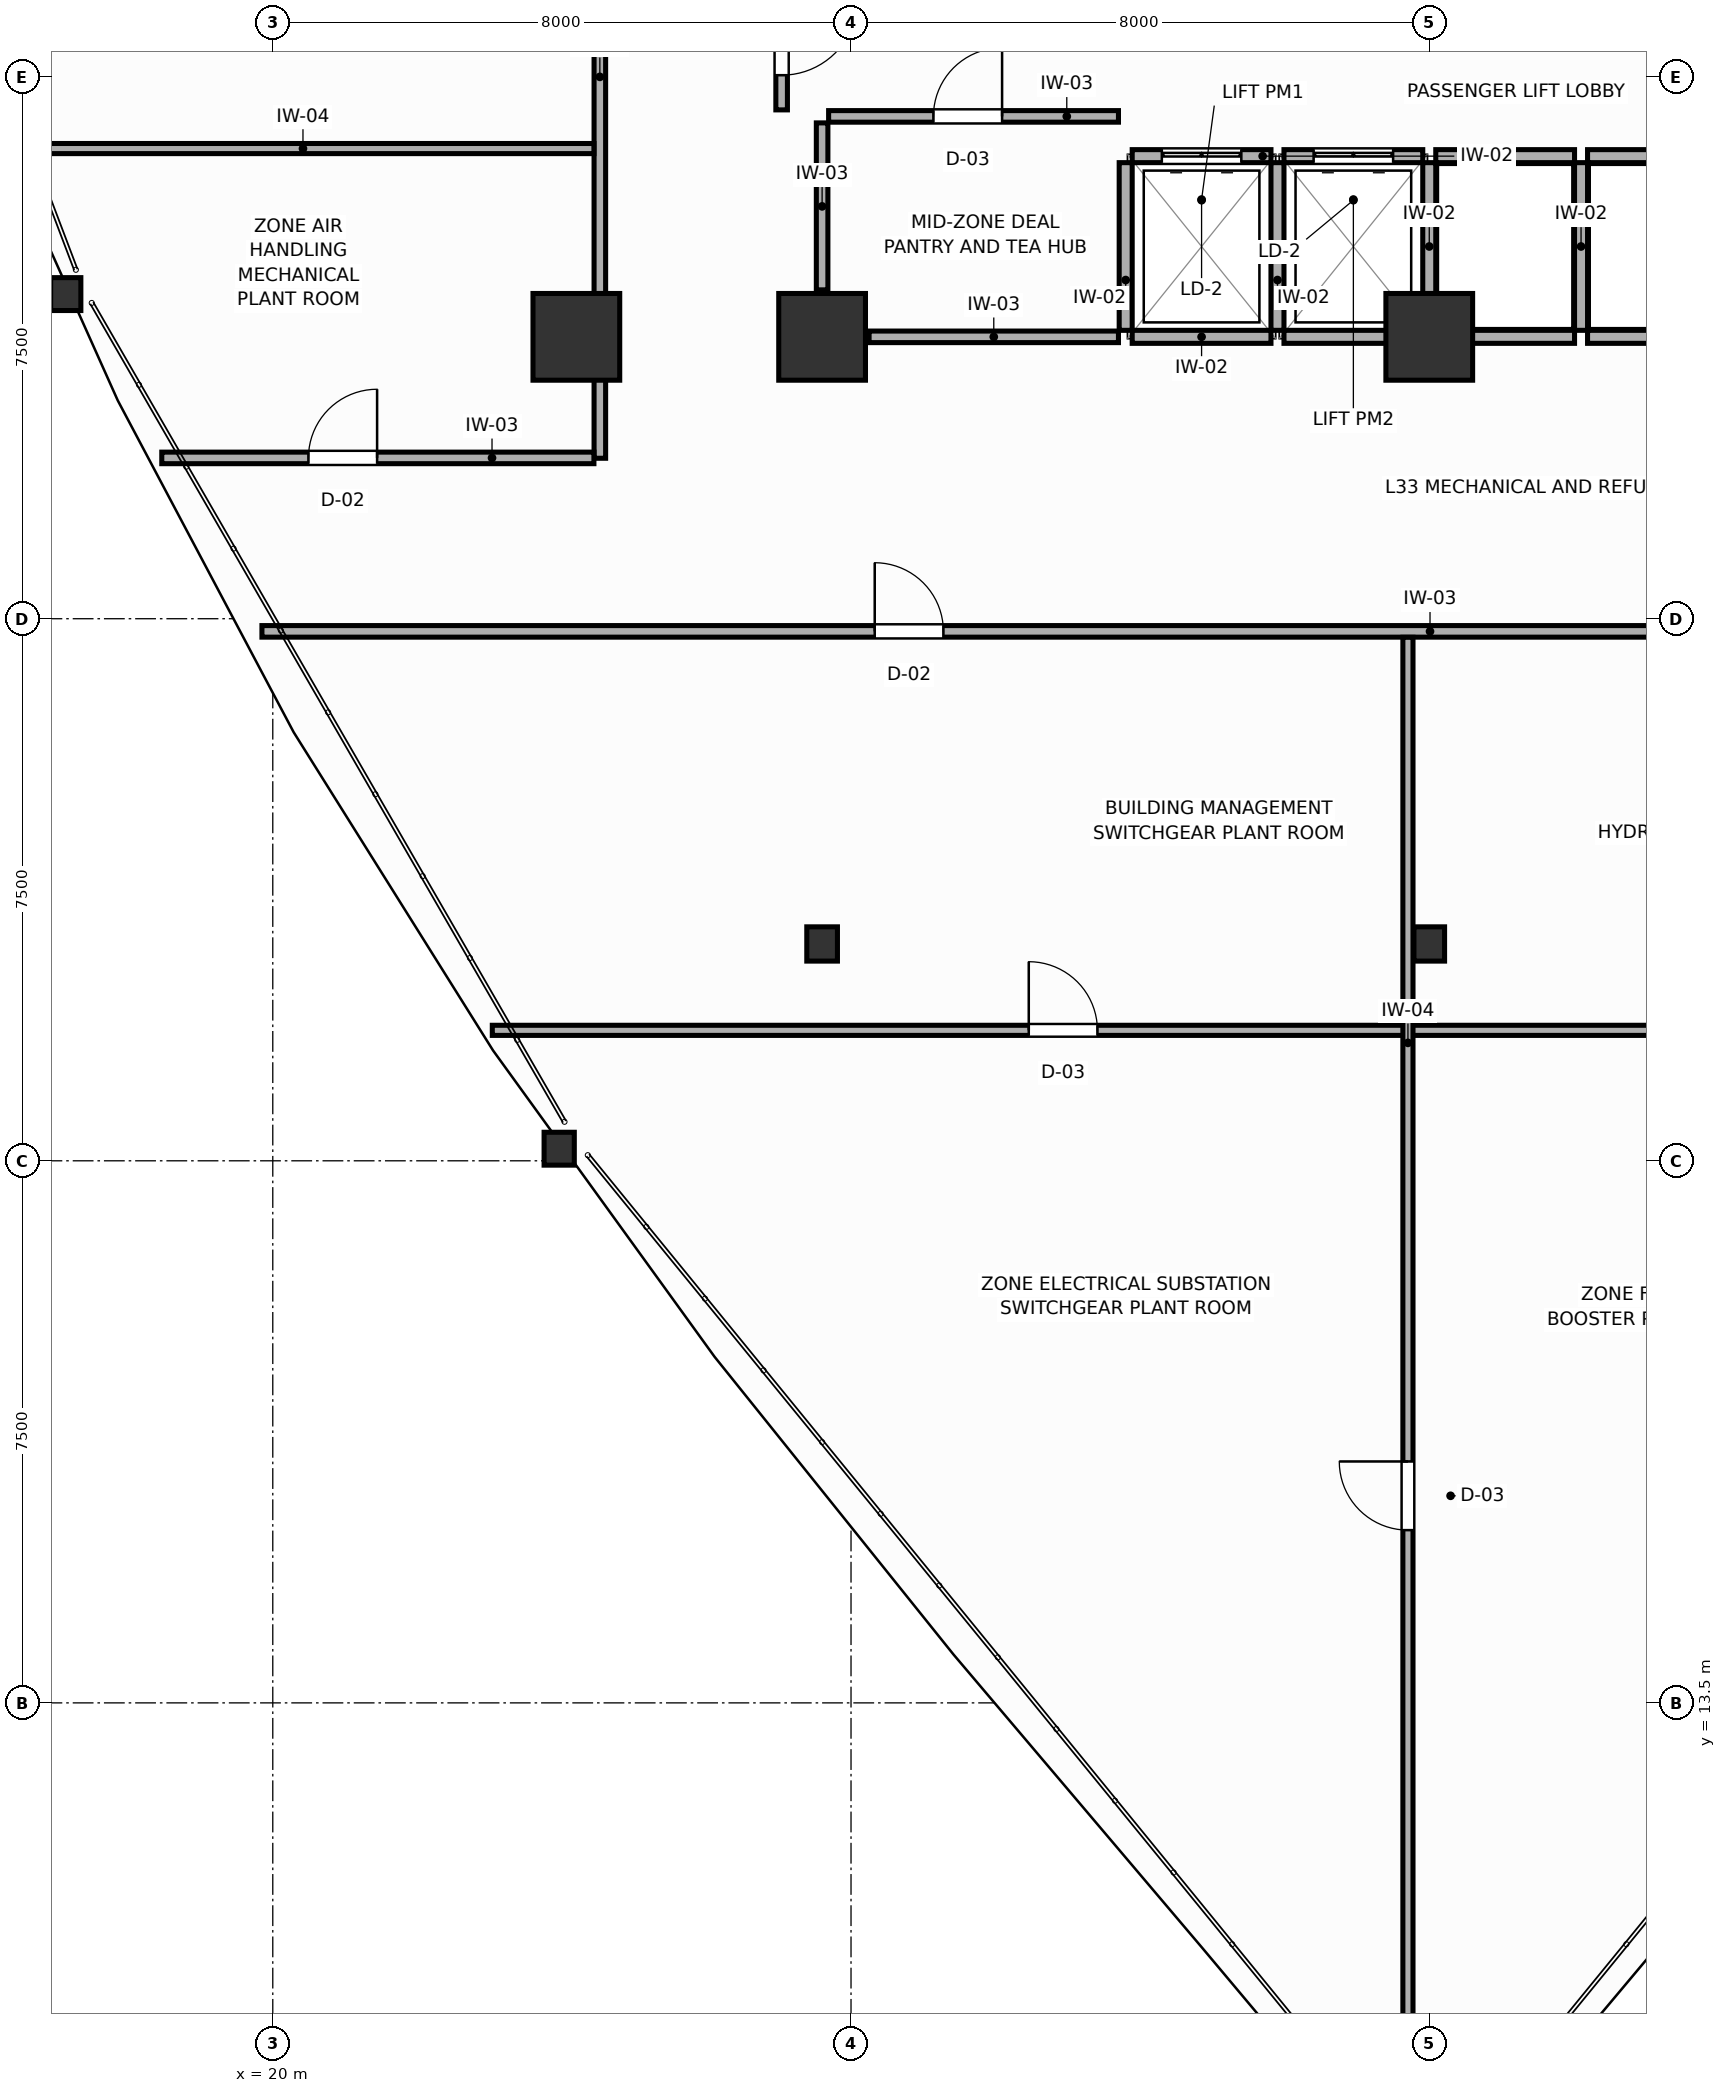
"""IFC4 building model, lengths in metres.
Left out: names, types, materials, properties, quantities, classifications, styles, units other than length and angle.
Written with IfcOpenShell. Run it as: python <this file> out.ifc"""

import sys

from ifc_helpers import new_model, si_unit, direction, frame, frame_2d, origin, origin_2d, place, context, subcontext, project, spatial, rectangle, i_section, extrude, source, transform, mapped, element, fill, save


model = new_model("IFC4")
c1 = context("Model", 3, precision=1e-05, world=origin(), true_north=direction((0.0, 1.0)))
c2 = subcontext(c1, "Body", "Model", "MODEL_VIEW")
j1 = project(units=[si_unit("LENGTHUNIT", "METRE"), si_unit("PLANEANGLEUNIT", "RADIAN")], contexts=[c1])
p1 = place(None, origin())
s1 = spatial("IfcSite", under=j1, at=p1, CompositionType="ELEMENT")
p2 = place(p1, origin())
s2 = spatial("IfcBuilding", under=s1, at=p2, CompositionType="ELEMENT")
p3 = place(p2, frame((0.0, 0.0, 131.4)))
s3 = spatial("IfcBuildingStorey", under=s2, at=p3, CompositionType="ELEMENT", Elevation=131.4)
m1 = source(origin(), c2, "Body", "SweptSolid", [
    extrude(rectangle(XDim=1.2, YDim=1.2, at=origin_2d()), origin(), (0.0, 0.0, 1.0), 4.8),
])
for number, where, z_axis, x_axis in (
    (1, (27.6, 32.4, 0.0), (0.0, 0.0, 1.0), (1.0, 0.0, 0.0)),
    (2, (36.0, 32.4, 0.0), (0.0, 0.0, 1.0), (1.0, 0.0, 0.0)),
    (3, (24.2, 32.4, 0.0), (0.0, 0.0, 1.0), (1.0, 0.0, 0.0)),
):
    element("IfcColumn", number, at=place(p3, frame(where, z_axis=z_axis, x_axis=x_axis)), inside=s3, PredefinedType="COLUMN", context=c2, shape_type="MappedRepresentation", body=[
        mapped(m1, transform((0.0, 0.0, 0.0), scale=1.0)),
    ])
m2 = source(origin(), c2, "Body", "SweptSolid", [
    extrude(i_section(OverallWidth=0.424, OverallDepth=0.474, WebThickness=0.045, FlangeThickness=0.072, FilletRadius=0.015, at=origin_2d()), origin(), (0.0, 0.0, 1.0), 4.8),
])
for number, where, z_axis, x_axis in (
    (4, (27.6, 24.0, 0.0), (0.0, 0.0, 1.0), (1.0, 0.0, 0.0)),
    (5, (36.0, 24.0, 0.0), (0.0, 0.0, 1.0), (1.0, 0.0, 0.0)),
):
    element("IfcColumn", number, at=place(p3, frame(where, z_axis=z_axis, x_axis=x_axis)), inside=s3, PredefinedType="COLUMN", context=c2, shape_type="MappedRepresentation", body=[
        mapped(m2, transform((0.0, 0.0, 0.0), scale=1.0)),
    ])
m3 = source(origin(), c2, "Body", "SweptSolid", [
    extrude(i_section(OverallWidth=0.418, OverallDepth=0.455, WebThickness=0.039, FlangeThickness=0.063, FilletRadius=0.015, at=origin_2d()), origin(), (0.0, 0.0, 1.0), 4.8),
])
for number, where, z_axis, x_axis in (
    (6, (17.136, 32.991, 0.0), (0.0, 0.0, 1.0), (1.0, 0.0, 0.0)),
    (7, (23.962, 21.167, 0.0), (0.0, 0.0, 1.0), (1.0, 0.0, 0.0)),
):
    element("IfcColumn", number, at=place(p3, frame(where, z_axis=z_axis, x_axis=x_axis)), inside=s3, PredefinedType="COLUMN", context=c2, shape_type="MappedRepresentation", body=[
        mapped(m3, transform((0.0, 0.0, 0.0), scale=1.0)),
    ])
p4 = place(p3, frame((31.89, 34.9, 0.0), z_axis=(0.0, 0.0, 1.0), x_axis=(1.0, 0.0, 0.0)))
e8 = element("IfcWall", 8, at=p4, inside=s3, PredefinedType="PARTITIONING", context=c2, shape_type="SweptSolid", body=[
    extrude(rectangle(XDim=1.92, YDim=0.18, at=frame_2d((0.96, 0.0))), origin(), (0.0, 0.0, 1.0), 4.6),
])
p5 = place(p4, frame((0.41, 0.0, 0.0)))
e9 = element("IfcOpeningElement", 9, at=p5, cuts=e8, PredefinedType="OPENING", context=c2, shape_type="SweptSolid", body=[
    extrude(rectangle(XDim=1.1, YDim=2.1, at=frame_2d((0.55, 1.05))), frame((0.0, 0.1, 0.0), z_axis=(0.0, -1.0, 0.0), x_axis=(1.0, 0.0, 0.0)), (0.0, 0.0, 1.0), 0.2),
])
p6 = place(p3, frame((31.89, 32.4, 0.0), z_axis=(0.0, 0.0, 1.0), x_axis=(1.0, 0.0, 0.0)))
e10 = element("IfcWall", 10, at=p6, inside=s3, PredefinedType="PARTITIONING", context=c2, shape_type="SweptSolid", body=[
    extrude(rectangle(XDim=1.92, YDim=0.18, at=frame_2d((0.96, 0.0))), origin(), (0.0, 0.0, 1.0), 2.57),
])
p7 = place(p3, frame((31.8, 32.49, 0.0), z_axis=(0.0, 0.0, 1.0), x_axis=(0.0, 1.0, 0.0)))
e11 = element("IfcWall", 11, at=p7, inside=s3, PredefinedType="PARTITIONING", context=c2, shape_type="SweptSolid", body=[
    extrude(rectangle(XDim=2.32, YDim=0.18, at=frame_2d((1.16, 0.0))), origin(), (0.0, 0.0, 1.0), 4.6),
])
p8 = place(p3, frame((33.99, 34.9, 0.0), z_axis=(0.0, 0.0, 1.0), x_axis=(1.0, 0.0, 0.0)))
e12 = element("IfcWall", 12, at=p8, inside=s3, PredefinedType="PARTITIONING", context=c2, shape_type="SweptSolid", body=[
    extrude(rectangle(XDim=1.92, YDim=0.18, at=frame_2d((0.96, 0.0))), origin(), (0.0, 0.0, 1.0), 4.6),
])
p9 = place(p8, frame((0.41, 0.0, 0.0)))
e13 = element("IfcOpeningElement", 13, at=p9, cuts=e12, PredefinedType="OPENING", context=c2, shape_type="SweptSolid", body=[
    extrude(rectangle(XDim=1.1, YDim=2.1, at=frame_2d((0.55, 1.05))), frame((0.0, 0.1, 0.0), z_axis=(0.0, -1.0, 0.0), x_axis=(1.0, 0.0, 0.0)), (0.0, 0.0, 1.0), 0.2),
])
p10 = place(p3, frame((33.99, 32.4, 0.0), z_axis=(0.0, 0.0, 1.0), x_axis=(1.0, 0.0, 0.0)))
e14 = element("IfcWall", 14, at=p10, inside=s3, PredefinedType="PARTITIONING", context=c2, shape_type="SweptSolid", body=[
    extrude(rectangle(XDim=1.92, YDim=0.18, at=frame_2d((0.96, 0.0))), origin(), (0.0, 0.0, 1.0), 2.57),
])
p11 = place(p3, frame((33.9, 32.49, 0.0), z_axis=(0.0, 0.0, 1.0), x_axis=(0.0, 1.0, 0.0)))
e15 = element("IfcWall", 15, at=p11, inside=s3, PredefinedType="PARTITIONING", context=c2, shape_type="SweptSolid", body=[
    extrude(rectangle(XDim=2.32, YDim=0.18, at=frame_2d((1.16, 0.0))), origin(), (0.0, 0.0, 1.0), 4.6),
])
p12 = place(p3, frame((36.09, 34.9, 0.0), z_axis=(0.0, 0.0, 1.0), x_axis=(1.0, 0.0, 0.0)))
e16 = element("IfcWall", 16, at=p12, inside=s3, PredefinedType="PARTITIONING", context=c2, shape_type="SweptSolid", body=[
    extrude(rectangle(XDim=1.92, YDim=0.18, at=frame_2d((0.96, 0.0))), origin(), (0.0, 0.0, 1.0), 4.6),
])
p13 = place(p3, frame((36.09, 32.4, 0.0), z_axis=(0.0, 0.0, 1.0), x_axis=(1.0, 0.0, 0.0)))
e17 = element("IfcWall", 17, at=p13, inside=s3, PredefinedType="PARTITIONING", context=c2, shape_type="SweptSolid", body=[
    extrude(rectangle(XDim=1.92, YDim=0.18, at=frame_2d((0.96, 0.0))), origin(), (0.0, 0.0, 1.0), 2.57),
])
p14 = place(p3, frame((36.0, 32.49, 0.0), z_axis=(0.0, 0.0, 1.0), x_axis=(0.0, 1.0, 0.0)))
e18 = element("IfcWall", 18, at=p14, inside=s3, PredefinedType="PARTITIONING", context=c2, shape_type="SweptSolid", body=[
    extrude(rectangle(XDim=2.32, YDim=0.18, at=frame_2d((1.16, 0.0))), origin(), (0.0, 0.0, 1.0), 4.6),
])
p15 = place(p3, frame((38.19, 34.9, 0.0), z_axis=(0.0, 0.0, 1.0), x_axis=(1.0, 0.0, 0.0)))
e19 = element("IfcWall", 19, at=p15, inside=s3, PredefinedType="PARTITIONING", context=c2, shape_type="SweptSolid", body=[
    extrude(rectangle(XDim=1.92, YDim=0.18, at=frame_2d((0.96, 0.0))), origin(), (0.0, 0.0, 1.0), 4.6),
])
p16 = place(p3, frame((38.19, 32.4, 0.0), z_axis=(0.0, 0.0, 1.0), x_axis=(1.0, 0.0, 0.0)))
e20 = element("IfcWall", 20, at=p16, inside=s3, PredefinedType="PARTITIONING", context=c2, shape_type="SweptSolid", body=[
    extrude(rectangle(XDim=1.92, YDim=0.18, at=frame_2d((0.96, 0.0))), origin(), (0.0, 0.0, 1.0), 2.57),
])
p17 = place(p3, frame((38.1, 32.49, 0.0), z_axis=(0.0, 0.0, 1.0), x_axis=(0.0, 1.0, 0.0)))
e21 = element("IfcWall", 21, at=p17, inside=s3, PredefinedType="PARTITIONING", context=c2, shape_type="SweptSolid", body=[
    extrude(rectangle(XDim=2.32, YDim=0.18, at=frame_2d((1.16, 0.0))), origin(), (0.0, 0.0, 1.0), 4.6),
])
p18 = place(p3, frame((28.25, 32.4, 0.0), z_axis=(0.0, 0.0, 1.0), x_axis=(1.0, 0.0, 0.0)))
e22 = element("IfcWall", 22, at=p18, inside=s3, PredefinedType="PARTITIONING", context=c2, shape_type="SweptSolid", body=[
    extrude(rectangle(XDim=3.45, YDim=0.16, at=frame_2d((1.725, 0.0))), origin(), (0.0, 0.0, 1.0), 2.57),
])
p19 = place(p3, frame((27.6, 33.05, 0.0), z_axis=(0.0, 0.0, 1.0), x_axis=(0.0, 1.0, 0.0)))
e23 = element("IfcWall", 23, at=p19, inside=s3, PredefinedType="PARTITIONING", context=c2, shape_type="SweptSolid", body=[
    extrude(rectangle(XDim=2.31, YDim=0.16, at=frame_2d((1.155, 0.0))), origin(), (0.0, 0.0, 1.0), 4.6),
])
p20 = place(p3, frame((27.69, 35.45, 0.0), z_axis=(0.0, 0.0, 1.0), x_axis=(1.0, 0.0, 0.0)))
e24 = element("IfcWall", 24, at=p20, inside=s3, PredefinedType="PARTITIONING", context=c2, shape_type="SweptSolid", body=[
    extrude(rectangle(XDim=4.01, YDim=0.16, at=frame_2d((2.005, 0.0))), origin(), (0.0, 0.0, 1.0), 4.6),
])
p21 = place(p20, frame((1.45, 0.0, 0.0)))
e25 = element("IfcOpeningElement", 25, at=p21, cuts=e24, PredefinedType="OPENING", context=c2, shape_type="SweptSolid", body=[
    extrude(rectangle(XDim=0.95, YDim=2.05, at=frame_2d((0.475, 1.025))), frame((0.0, 0.09, 0.0), z_axis=(0.0, -1.0, 0.0), x_axis=(1.0, 0.0, 0.0)), (0.0, 0.0, 1.0), 0.18),
])
p22 = place(p3, frame((27.04, 35.54, 0.0), z_axis=(0.0, 0.0, 1.0), x_axis=(0.0, 1.0, 0.0)))
e26 = element("IfcWall", 26, at=p22, inside=s3, PredefinedType="PARTITIONING", context=c2, shape_type="SweptSolid", body=[
    extrude(rectangle(XDim=2.11, YDim=0.16, at=frame_2d((1.055, 0.0))), origin(), (0.0, 0.0, 1.0), 4.6),
])
p23 = place(p22, frame((0.48, 0.0, 0.0)))
e27 = element("IfcOpeningElement", 27, at=p23, cuts=e26, PredefinedType="OPENING", context=c2, shape_type="SweptSolid", body=[
    extrude(rectangle(XDim=1.05, YDim=2.1, at=frame_2d((0.525, 1.05))), frame((0.0, 0.09, 0.0), z_axis=(0.0, -1.0, 0.0), x_axis=(1.0, 0.0, 0.0)), (0.0, 0.0, 1.0), 0.18),
])
p24 = place(p3, frame((19.85, 28.325, 0.0), z_axis=(0.0, 0.0, 1.0), x_axis=(1.0, 0.0, 0.0)))
e28 = element("IfcWall", 28, at=p24, inside=s3, PredefinedType="PARTITIONING", context=c2, shape_type="SweptSolid", body=[
    extrude(rectangle(XDim=32.3, YDim=0.16, at=frame_2d((16.15, 0.0))), origin(), (0.0, 0.0, 1.0), 4.6),
])
p25 = place(p24, frame((8.478, 0.0, 0.0)))
e29 = element("IfcOpeningElement", 29, at=p25, cuts=e28, PredefinedType="OPENING", context=c2, shape_type="SweptSolid", body=[
    extrude(rectangle(XDim=0.95, YDim=2.05, at=frame_2d((0.475, 1.025))), frame((0.0, 0.09, 0.0), z_axis=(0.0, -1.0, 0.0), x_axis=(1.0, 0.0, 0.0)), (0.0, 0.0, 1.0), 0.18),
])
p26 = place(p24, frame((22.893, 0.0, 0.0)))
e30 = element("IfcOpeningElement", 30, at=p26, cuts=e28, PredefinedType="OPENING", context=c2, shape_type="SweptSolid", body=[
    extrude(rectangle(XDim=0.95, YDim=2.05, at=frame_2d((0.475, 1.025))), frame((0.0, 0.09, 0.0), z_axis=(0.0, -1.0, 0.0), x_axis=(1.0, 0.0, 0.0)), (0.0, 0.0, 1.0), 0.18),
])
p27 = place(p3, frame((24.525, 30.72, 0.0), z_axis=(0.0, 0.0, 1.0), x_axis=(0.0, 1.0, 0.0)))
e31 = element("IfcWall", 31, at=p27, inside=s3, PredefinedType="PARTITIONING", context=c2, shape_type="SweptSolid", body=[
    extrude(rectangle(XDim=18.463, YDim=0.16, at=frame_2d((9.231, 0.0))), origin(), (0.0, 0.0, 1.0), 4.6),
])
p28 = place(p27, frame((10.734, 0.0, 0.0)))
e32 = element("IfcOpeningElement", 32, at=p28, cuts=e31, PredefinedType="OPENING", context=c2, shape_type="SweptSolid", body=[
    extrude(rectangle(XDim=0.95, YDim=2.05, at=frame_2d((0.475, 1.025))), frame((0.0, 0.09, 0.0), z_axis=(0.0, -1.0, 0.0), x_axis=(1.0, 0.0, 0.0)), (0.0, 0.0, 1.0), 0.18),
])
p29 = place(p3, frame((18.464, 30.725, 0.0), z_axis=(0.0, 0.0, 1.0), x_axis=(1.0, 0.0, 0.0)))
e33 = element("IfcWall", 33, at=p29, inside=s3, PredefinedType="PARTITIONING", context=c2, shape_type="SweptSolid", body=[
    extrude(rectangle(XDim=5.979, YDim=0.16, at=frame_2d((2.989, 0.0))), origin(), (0.0, 0.0, 1.0), 4.6),
])
p30 = place(p29, frame((2.029, 0.0, 0.0)))
e34 = element("IfcOpeningElement", 34, at=p30, cuts=e33, PredefinedType="OPENING", context=c2, shape_type="SweptSolid", body=[
    extrude(rectangle(XDim=0.95, YDim=2.05, at=frame_2d((0.475, 1.025))), frame((0.0, 0.09, 0.0), z_axis=(0.0, -1.0, 0.0), x_axis=(1.0, 0.0, 0.0)), (0.0, 0.0, 1.0), 0.18),
])
p31 = place(p3, frame((23.037, 22.805, 0.0), z_axis=(0.0, 0.0, 1.0), x_axis=(1.0, 0.0, 0.0)))
e35 = element("IfcWall", 35, at=p31, inside=s3, PredefinedType="PARTITIONING", context=c2, shape_type="SweptSolid", body=[
    extrude(rectangle(XDim=25.926, YDim=0.14, at=frame_2d((12.963, 0.0))), origin(), (0.0, 0.0, 1.0), 4.6),
])
p32 = place(p31, frame((7.422, 0.0, 0.0)))
e36 = element("IfcOpeningElement", 36, at=p32, cuts=e35, PredefinedType="OPENING", context=c2, shape_type="SweptSolid", body=[
    extrude(rectangle(XDim=0.95, YDim=2.05, at=frame_2d((0.475, 1.025))), frame((0.0, 0.08, 0.0), z_axis=(0.0, -1.0, 0.0), x_axis=(1.0, 0.0, 0.0)), (0.0, 0.0, 1.0), 0.16),
])
p33 = place(p3, frame((35.705, 8.783, 0.0), z_axis=(0.0, 0.0, 1.0), x_axis=(0.0, 1.0, 0.0)))
e37 = element("IfcWall", 37, at=p33, inside=s3, PredefinedType="PARTITIONING", context=c2, shape_type="SweptSolid", body=[
    extrude(rectangle(XDim=19.46, YDim=0.14, at=frame_2d((9.73, 0.0))), origin(), (0.0, 0.0, 1.0), 2.57),
])
p34 = place(p33, frame((7.107, 0.0, 0.0)))
e38 = element("IfcOpeningElement", 38, at=p34, cuts=e37, PredefinedType="OPENING", context=c2, shape_type="SweptSolid", body=[
    extrude(rectangle(XDim=0.95, YDim=2.05, at=frame_2d((0.475, 1.025))), frame((0.0, 0.08, 0.0), z_axis=(0.0, -1.0, 0.0), x_axis=(1.0, 0.0, 0.0)), (0.0, 0.0, 1.0), 0.16),
])
p35 = place(p3, frame((16.392, 35.005, 0.0), z_axis=(0.0, 0.0, 1.0), x_axis=(1.0, 0.0, 0.0)))
e39 = element("IfcWall", 39, at=p35, inside=s3, PredefinedType="PARTITIONING", context=c2, shape_type="SweptSolid", body=[
    extrude(rectangle(XDim=8.051, YDim=0.14, at=frame_2d((4.025, 0.0))), origin(), (0.0, 0.0, 1.0), 4.6),
])
p36 = place(p5, origin())
e40 = element("IfcDoor", 40, at=p36, inside=s3, OperationType="DOUBLE_DOOR_SLIDING", PredefinedType="DOOR", context=c2, shape_type="SweptSolid", body=[
    extrude(rectangle(XDim=1.1, YDim=2.1, at=frame_2d((0.55, 1.05))), frame((0.0, 0.025, 0.0), z_axis=(0.0, -1.0, 0.0), x_axis=(1.0, 0.0, 0.0)), (0.0, 0.0, 1.0), 0.05),
])
fill(e9, e40)
p37 = place(p9, origin())
e41 = element("IfcDoor", 41, at=p37, inside=s3, OperationType="DOUBLE_DOOR_SLIDING", PredefinedType="DOOR", context=c2, shape_type="SweptSolid", body=[
    extrude(rectangle(XDim=1.1, YDim=2.1, at=frame_2d((0.55, 1.05))), frame((0.0, 0.025, 0.0), z_axis=(0.0, -1.0, 0.0), x_axis=(1.0, 0.0, 0.0)), (0.0, 0.0, 1.0), 0.05),
])
fill(e13, e41)
p38 = place(p21, origin())
e42 = element("IfcDoor", 42, at=p38, inside=s3, OperationType="SINGLE_SWING_RIGHT", PredefinedType="DOOR", context=c2, shape_type="SweptSolid", body=[
    extrude(rectangle(XDim=0.95, YDim=2.05, at=frame_2d((0.475, 1.025))), frame((0.0, 0.025, 0.0), z_axis=(0.0, -1.0, 0.0), x_axis=(1.0, 0.0, 0.0)), (0.0, 0.0, 1.0), 0.05),
])
fill(e25, e42)
p39 = place(p23, frame((1.05, 0.0, 0.0), z_axis=(0.0, 0.0, 1.0), x_axis=(-1.0, 0.0, 0.0)))
e43 = element("IfcDoor", 43, at=p39, inside=s3, OperationType="SINGLE_SWING_LEFT", PredefinedType="DOOR", context=c2, shape_type="SweptSolid", body=[
    extrude(rectangle(XDim=1.05, YDim=2.1, at=frame_2d((0.525, 1.05))), frame((0.0, 0.025, 0.0), z_axis=(0.0, -1.0, 0.0), x_axis=(1.0, 0.0, 0.0)), (0.0, 0.0, 1.0), 0.05),
])
fill(e27, e43)
p40 = place(p25, origin())
e44 = element("IfcDoor", 44, at=p40, inside=s3, OperationType="SINGLE_SWING_LEFT", PredefinedType="DOOR", context=c2, shape_type="SweptSolid", body=[
    extrude(rectangle(XDim=0.95, YDim=2.05, at=frame_2d((0.475, 1.025))), frame((0.0, 0.025, 0.0), z_axis=(0.0, -1.0, 0.0), x_axis=(1.0, 0.0, 0.0)), (0.0, 0.0, 1.0), 0.05),
])
fill(e29, e44)
p41 = place(p30, origin())
e45 = element("IfcDoor", 45, at=p41, inside=s3, OperationType="SINGLE_SWING_RIGHT", PredefinedType="DOOR", context=c2, shape_type="SweptSolid", body=[
    extrude(rectangle(XDim=0.95, YDim=2.05, at=frame_2d((0.475, 1.025))), frame((0.0, 0.025, 0.0), z_axis=(0.0, -1.0, 0.0), x_axis=(1.0, 0.0, 0.0)), (0.0, 0.0, 1.0), 0.05),
])
fill(e34, e45)
p42 = place(p32, origin())
e46 = element("IfcDoor", 46, at=p42, inside=s3, OperationType="SINGLE_SWING_LEFT", PredefinedType="DOOR", context=c2, shape_type="SweptSolid", body=[
    extrude(rectangle(XDim=0.95, YDim=2.05, at=frame_2d((0.475, 1.025))), frame((0.0, 0.025, 0.0), z_axis=(0.0, -1.0, 0.0), x_axis=(1.0, 0.0, 0.0)), (0.0, 0.0, 1.0), 0.05),
])
fill(e36, e46)
p43 = place(p34, origin())
e47 = element("IfcDoor", 47, at=p43, inside=s3, OperationType="SINGLE_SWING_RIGHT", PredefinedType="DOOR", context=c2, shape_type="SweptSolid", body=[
    extrude(rectangle(XDim=0.95, YDim=2.05, at=frame_2d((0.475, 1.025))), frame((0.0, 0.025, 0.0), z_axis=(0.0, -1.0, 0.0), x_axis=(1.0, 0.0, 0.0)), (0.0, 0.0, 1.0), 0.05),
])
fill(e38, e47)
save(model, sys.argv[1])
